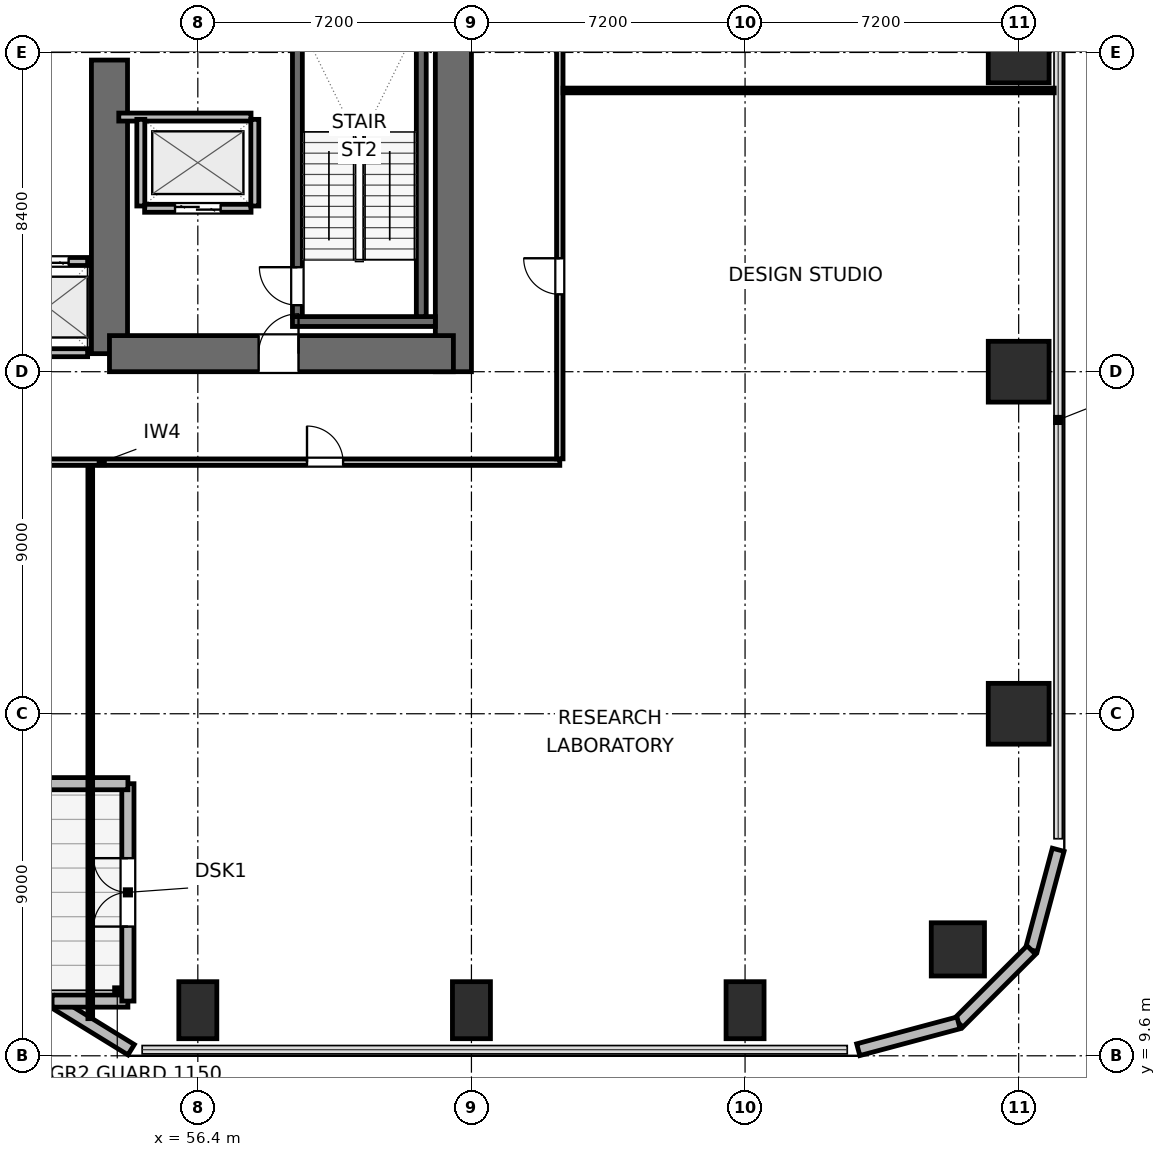
"""IFC4 building model, lengths in metres.
Left out: names, types, materials, properties, quantities, classifications, styles, units other than length and angle.
Written with IfcOpenShell. Run it as: python <this file> out.ifc"""

import sys

from ifc_helpers import new_model, si_unit, direction, frame, frame_2d, origin, origin_2d, place, context, subcontext, project, spatial, rectangle, circle, extrude, element, fill, save


model = new_model("IFC4")
c1 = context("Model", 3, precision=1e-05, world=origin(), true_north=direction((0.0, 1.0)))
c2 = subcontext(c1, "Body", "Model", "MODEL_VIEW")
j1 = project(units=[si_unit("LENGTHUNIT", "METRE"), si_unit("PLANEANGLEUNIT", "RADIAN")], contexts=[c1])
p1 = place(None, origin())
s1 = spatial("IfcSite", under=j1, at=p1, CompositionType="ELEMENT")
p2 = place(p1, origin())
s2 = spatial("IfcBuilding", under=s1, at=p2, CompositionType="ELEMENT")
p3 = place(p2, frame((0.0, 0.0, 68.4)))
s3 = spatial("IfcBuildingStorey", under=s2, at=p3, CompositionType="ELEMENT", Elevation=68.4)
p4 = place(p3, frame((54.075, 28.075, 0.0), z_axis=(0.0, 0.0, 1.0), x_axis=(0.0, 1.0, 0.0)))
e1 = element("IfcWall", 1, at=p4, inside=s3, PredefinedType="SHEAR", context=c2, shape_type="SweptSolid", body=[
    extrude(rectangle(XDim=7.725, YDim=0.95, at=frame_2d((3.863, 0.0))), origin(), (0.0, 0.0, 1.0), 4.5),
])
p5 = place(p3, frame((63.125, 27.6, 0.0), z_axis=(0.0, 0.0, 1.0), x_axis=(0.0, 1.0, 0.0)))
e2 = element("IfcWall", 2, at=p5, inside=s3, PredefinedType="SHEAR", context=c2, shape_type="SweptSolid", body=[
    extrude(rectangle(XDim=16.8, YDim=0.95, at=frame_2d((8.4, 0.0))), origin(), (0.0, 0.0, 1.0), 4.5),
])
p6 = place(p3, frame((54.075, 28.075, 0.0), z_axis=(0.0, 0.0, 1.0), x_axis=(1.0, 0.0, 0.0)))
e3 = element("IfcWall", 3, at=p6, inside=s3, PredefinedType="SHEAR", context=c2, shape_type="SweptSolid", body=[
    extrude(rectangle(XDim=9.05, YDim=0.95, at=frame_2d((4.525, 0.0))), origin(), (0.0, 0.0, 1.0), 4.5),
])
p7 = place(p6, frame((3.925, 0.0, 0.0)))
e4 = element("IfcOpeningElement", 4, at=p7, cuts=e3, PredefinedType="OPENING", context=c2, shape_type="SweptSolid", body=[
    extrude(rectangle(XDim=1.05, YDim=2.04, at=frame_2d((0.525, 1.02))), frame((0.0, 0.485, 0.0), z_axis=(0.0, -1.0, 0.0), x_axis=(1.0, 0.0, 0.0)), (0.0, 0.0, 1.0), 0.97),
])
p8 = place(p3, frame((58.89, 28.92, 0.0), z_axis=(0.0, 0.0, 1.0), x_axis=(1.0, 0.0, 0.0)))
e5 = element("IfcWall", 5, at=p8, inside=s3, PredefinedType="SHEAR", context=c2, shape_type="SweptSolid", body=[
    extrude(rectangle(XDim=3.76, YDim=0.26, at=frame_2d((1.88, 0.0))), origin(), (0.0, 0.0, 1.0), 4.5),
])
p9 = place(p3, frame((59.02, 29.05, 0.0), z_axis=(0.0, 0.0, 1.0), x_axis=(0.0, 1.0, 0.0)))
e6 = element("IfcWall", 6, at=p9, inside=s3, PredefinedType="SHEAR", context=c2, shape_type="SweptSolid", body=[
    extrude(rectangle(XDim=7.6, YDim=0.26, at=frame_2d((3.8, 0.0))), origin(), (0.0, 0.0, 1.0), 4.5),
])
p10 = place(p9, frame((0.3, 0.0, 0.0)))
e7 = element("IfcOpeningElement", 7, at=p10, cuts=e6, PredefinedType="OPENING", context=c2, shape_type="SweptSolid", body=[
    extrude(rectangle(XDim=1.0, YDim=2.04, at=frame_2d((0.5, 1.02))), frame((0.0, 0.14, 0.0), z_axis=(0.0, -1.0, 0.0), x_axis=(1.0, 0.0, 0.0)), (0.0, 0.0, 1.0), 0.28),
])
p11 = place(p3, frame((62.28, 29.05, 0.0), z_axis=(0.0, 0.0, 1.0), x_axis=(0.0, 1.0, 0.0)))
e8 = element("IfcWall", 8, at=p11, inside=s3, PredefinedType="SHEAR", context=c2, shape_type="SweptSolid", body=[
    extrude(rectangle(XDim=7.6, YDim=0.26, at=frame_2d((3.8, 0.0))), origin(), (0.0, 0.0, 1.0), 4.5),
])
p12 = place(p3, frame((76.4, 12.4, 0.0), z_axis=(0.0, 0.0, 1.0), x_axis=(1.0, 0.0, 0.0)))
e9 = element("IfcColumn", 9, at=p12, inside=s3, PredefinedType="COLUMN", context=c2, shape_type="SweptSolid", body=[
    extrude(circle(Radius=0.7, at=origin_2d()), origin(), (0.0, 0.0, 1.0), 4.5),
])
for number, where, z_axis, x_axis in (
    (10, (56.4, 10.8, 0.0), (0.0, 0.0, 1.0), (1.0, 0.0, 0.0)),
    (11, (63.6, 10.8, 0.0), (0.0, 0.0, 1.0), (1.0, 0.0, 0.0)),
    (12, (70.8, 10.8, 0.0), (0.0, 0.0, 1.0), (1.0, 0.0, 0.0)),
):
    element("IfcColumn", number, at=place(p3, frame(where, z_axis=z_axis, x_axis=x_axis)), inside=s3, PredefinedType="COLUMN", context=c2, shape_type="SweptSolid", body=[
        extrude(rectangle(XDim=1.0, YDim=1.5, at=origin_2d()), origin(), (0.0, 0.0, 1.0), 4.5),
    ])
for number, where, z_axis, x_axis in (
    (13, (78.0, 18.6, 0.0), (0.0, 0.0, 1.0), (1.0, 0.0, 0.0)),
    (14, (78.0, 27.6, 0.0), (0.0, 0.0, 1.0), (1.0, 0.0, 0.0)),
    (15, (78.0, 36.0, 0.0), (0.0, 0.0, 1.0), (1.0, 0.0, 0.0)),
):
    element("IfcColumn", number, at=place(p3, frame(where, z_axis=z_axis, x_axis=x_axis)), inside=s3, PredefinedType="COLUMN", context=c2, shape_type="SweptSolid", body=[
        extrude(rectangle(XDim=1.6, YDim=1.6, at=origin_2d()), origin(), (0.0, 0.0, 1.0), 4.5),
    ])
p13 = place(p3, frame((79.04, 15.021, 0.0), z_axis=(0.0, 0.0, 1.0), x_axis=(-0.25869736047, -0.965958423373, 0.0)))
e16 = element("IfcWall", 16, at=p13, inside=s3, PredefinedType="SOLIDWALL", context=c2, shape_type="SweptSolid", body=[
    extrude(rectangle(XDim=2.731, YDim=0.32, at=frame_2d((1.366, 0.0))), origin(), (0.0, 0.0, 1.0), 4.24),
])
p14 = place(p3, frame((78.333, 12.383, 0.0), z_axis=(0.0, 0.0, 1.0), x_axis=(-0.707106781187, -0.707106781187, 0.0)))
e17 = element("IfcWall", 17, at=p14, inside=s3, PredefinedType="SOLIDWALL", context=c2, shape_type="SweptSolid", body=[
    extrude(rectangle(XDim=2.71, YDim=0.32, at=frame_2d((1.355, 0.0))), origin(), (0.0, 0.0, 1.0), 4.24),
])
p15 = place(p3, frame((76.417, 10.467, 0.0), z_axis=(0.0, 0.0, 1.0), x_axis=(-0.965964405026, -0.25867502435, 0.0)))
e18 = element("IfcWall", 18, at=p15, inside=s3, PredefinedType="SOLIDWALL", context=c2, shape_type="SweptSolid", body=[
    extrude(rectangle(XDim=2.731, YDim=0.32, at=frame_2d((1.366, 0.0))), origin(), (0.0, 0.0, 1.0), 4.24),
])
p16 = place(p3, frame((54.645, 9.76, 0.0), z_axis=(0.0, 0.0, 1.0), x_axis=(-0.8516617488, 0.524091848469, 0.0)))
e19 = element("IfcWall", 19, at=p16, inside=s3, PredefinedType="SOLIDWALL", context=c2, shape_type="SweptSolid", body=[
    extrude(rectangle(XDim=2.442, YDim=0.32, at=frame_2d((1.221, 0.0))), origin(), (0.0, 0.0, 1.0), 4.24),
])
p17 = place(p3, frame((52.565, 11.04, 0.0), z_axis=(0.0, 0.0, 1.0), x_axis=(1.0, 0.0, 0.0)))
e20 = element("IfcWall", 20, at=p17, inside=s3, PredefinedType="SOLIDWALL", context=c2, shape_type="SweptSolid", body=[
    extrude(rectangle(XDim=1.995, YDim=0.32, at=frame_2d((0.998, 0.0))), origin(), (0.0, 0.0, 1.0), 3.475),
])
p18 = place(p3, frame((54.56, 11.04, 0.0), z_axis=(0.0, 0.0, 1.0), x_axis=(0.0, 1.0, 0.0)))
e21 = element("IfcWall", 21, at=p18, inside=s3, PredefinedType="SOLIDWALL", context=c2, shape_type="SweptSolid", body=[
    extrude(rectangle(XDim=5.72, YDim=0.32, at=frame_2d((2.86, 0.0))), origin(), (0.0, 0.0, 1.0), 3.475),
])
p19 = place(p18, frame((1.96, 0.0, 0.0)))
e22 = element("IfcOpeningElement", 22, at=p19, cuts=e21, PredefinedType="OPENING", context=c2, shape_type="SweptSolid", body=[
    extrude(rectangle(XDim=1.8, YDim=2.1, at=frame_2d((0.9, 1.05))), frame((0.0, 0.17, 0.0), z_axis=(0.0, -1.0, 0.0), x_axis=(1.0, 0.0, 0.0)), (0.0, 0.0, 1.0), 0.34),
])
p20 = place(p3, frame((54.56, 16.76, 0.0), z_axis=(0.0, 0.0, 1.0), x_axis=(-1.0, 0.0, 0.0)))
e23 = element("IfcWall", 23, at=p20, inside=s3, PredefinedType="SOLIDWALL", context=c2, shape_type="SweptSolid", body=[
    extrude(rectangle(XDim=13.12, YDim=0.32, at=frame_2d((6.56, 0.0))), origin(), (0.0, 0.0, 1.0), 3.53),
])
p21 = place(p3, frame((55.0, 31.9, 0.0), z_axis=(0.0, 0.0, 1.0), x_axis=(1.0, 0.0, 0.0)))
e24 = element("IfcWall", 24, at=p21, inside=s3, PredefinedType="PARTITIONING", context=c2, shape_type="SweptSolid", body=[
    extrude(rectangle(XDim=2.8, YDim=0.21, at=frame_2d((1.4, 0.0))), origin(), (0.0, 0.0, 1.0), 4.24),
])
p22 = place(p21, frame((0.8, 0.0, 0.0)))
e25 = element("IfcOpeningElement", 25, at=p22, cuts=e24, PredefinedType="OPENING", context=c2, shape_type="SweptSolid", body=[
    extrude(rectangle(XDim=1.2, YDim=2.04, at=frame_2d((0.6, 1.02))), frame((0.0, 0.115, 0.0), z_axis=(0.0, -1.0, 0.0), x_axis=(1.0, 0.0, 0.0)), (0.0, 0.0, 1.0), 0.23),
])
p23 = place(p3, frame((54.32, 34.3, 0.0), z_axis=(0.0, 0.0, 1.0), x_axis=(1.0, 0.0, 0.0)))
e26 = element("IfcWall", 26, at=p23, inside=s3, PredefinedType="PARTITIONING", context=c2, shape_type="SweptSolid", body=[
    extrude(rectangle(XDim=3.48, YDim=0.21, at=frame_2d((1.74, 0.0))), origin(), (0.0, 0.0, 1.0), 4.24),
])
for number, where, z_axis, x_axis in (
    (27, (54.9, 31.96, 0.0), (0.0, 0.0, 1.0), (0.0, 1.0, 0.0)),
    (28, (57.9, 31.96, 0.0), (0.0, 0.0, 1.0), (0.0, 1.0, 0.0)),
):
    element("IfcWall", number, at=place(p3, frame(where, z_axis=z_axis, x_axis=x_axis)), inside=s3, PredefinedType="PARTITIONING", context=c2, shape_type="SweptSolid", body=[
        extrude(rectangle(XDim=2.28, YDim=0.21, at=frame_2d((1.14, 0.0))), origin(), (0.0, 0.0, 1.0), 4.24),
    ])
p24 = place(p3, frame((51.4, 30.5, 0.0), z_axis=(0.0, 0.0, 1.0), x_axis=(1.0, 0.0, 0.0)))
e29 = element("IfcWall", 29, at=p24, inside=s3, PredefinedType="PARTITIONING", context=c2, shape_type="SweptSolid", body=[
    extrude(rectangle(XDim=2.1, YDim=0.21, at=frame_2d((1.05, 0.0))), origin(), (0.0, 0.0, 1.0), 4.24),
])
p25 = place(p24, frame((0.5, 0.0, 0.0)))
e30 = element("IfcOpeningElement", 30, at=p25, cuts=e29, PredefinedType="OPENING", context=c2, shape_type="SweptSolid", body=[
    extrude(rectangle(XDim=1.1, YDim=2.04, at=frame_2d((0.55, 1.02))), frame((0.0, 0.115, 0.0), z_axis=(0.0, -1.0, 0.0), x_axis=(1.0, 0.0, 0.0)), (0.0, 0.0, 1.0), 0.23),
])
p26 = place(p3, frame((51.4, 28.1, 0.0), z_axis=(0.0, 0.0, 1.0), x_axis=(1.0, 0.0, 0.0)))
e31 = element("IfcWall", 31, at=p26, inside=s3, PredefinedType="PARTITIONING", context=c2, shape_type="SweptSolid", body=[
    extrude(rectangle(XDim=2.1, YDim=0.21, at=frame_2d((1.05, 0.0))), origin(), (0.0, 0.0, 1.0), 3.125),
])
p27 = place(p3, frame((30.075, 25.22, 0.0), z_axis=(0.0, 0.0, 1.0), x_axis=(1.0, 0.0, 0.0)))
e32 = element("IfcWall", 32, at=p27, inside=s3, PredefinedType="PARTITIONING", context=c2, shape_type="SweptSolid", body=[
    extrude(rectangle(XDim=35.85, YDim=0.17, at=frame_2d((17.925, 0.0))), origin(), (0.0, 0.0, 1.0), 4.24),
])
p28 = place(p27, frame((5.698, 0.0, 0.0)))
e33 = element("IfcOpeningElement", 33, at=p28, cuts=e32, PredefinedType="OPENING", context=c2, shape_type="SweptSolid", body=[
    extrude(rectangle(XDim=0.95, YDim=2.04, at=frame_2d((0.475, 1.02))), frame((0.0, 0.095, 0.0), z_axis=(0.0, -1.0, 0.0), x_axis=(1.0, 0.0, 0.0)), (0.0, 0.0, 1.0), 0.19),
])
p29 = place(p27, frame((17.445, 0.0, 0.0)))
e34 = element("IfcOpeningElement", 34, at=p29, cuts=e32, PredefinedType="OPENING", context=c2, shape_type="SweptSolid", body=[
    extrude(rectangle(XDim=0.95, YDim=2.04, at=frame_2d((0.475, 1.02))), frame((0.0, 0.095, 0.0), z_axis=(0.0, -1.0, 0.0), x_axis=(1.0, 0.0, 0.0)), (0.0, 0.0, 1.0), 0.19),
])
p30 = place(p27, frame((29.198, 0.0, 0.0)))
e35 = element("IfcOpeningElement", 35, at=p30, cuts=e32, PredefinedType="OPENING", context=c2, shape_type="SweptSolid", body=[
    extrude(rectangle(XDim=0.95, YDim=2.04, at=frame_2d((0.475, 1.02))), frame((0.0, 0.095, 0.0), z_axis=(0.0, -1.0, 0.0), x_axis=(1.0, 0.0, 0.0)), (0.0, 0.0, 1.0), 0.19),
])
p31 = place(p3, frame((65.925, 25.307, 0.0), z_axis=(0.0, 0.0, 1.0), x_axis=(0.0, 1.0, 0.0)))
e36 = element("IfcWall", 36, at=p31, inside=s3, PredefinedType="PARTITIONING", context=c2, shape_type="SweptSolid", body=[
    extrude(rectangle(XDim=21.386, YDim=0.17, at=frame_2d((10.693, 0.0))), origin(), (0.0, 0.0, 1.0), 4.24),
])
p32 = place(p31, frame((4.328, 0.0, 0.0)))
e37 = element("IfcOpeningElement", 37, at=p32, cuts=e36, PredefinedType="OPENING", context=c2, shape_type="SweptSolid", body=[
    extrude(rectangle(XDim=0.95, YDim=2.04, at=frame_2d((0.475, 1.02))), frame((0.0, 0.095, 0.0), z_axis=(0.0, -1.0, 0.0), x_axis=(1.0, 0.0, 0.0)), (0.0, 0.0, 1.0), 0.19),
])
p33 = place(p31, frame((15.108, 0.0, 0.0)))
e38 = element("IfcOpeningElement", 38, at=p33, cuts=e36, PredefinedType="OPENING", context=c2, shape_type="SweptSolid", body=[
    extrude(rectangle(XDim=0.95, YDim=2.04, at=frame_2d((0.475, 1.02))), frame((0.0, 0.095, 0.0), z_axis=(0.0, -1.0, 0.0), x_axis=(1.0, 0.0, 0.0)), (0.0, 0.0, 1.0), 0.19),
])
p34 = place(p3, frame((53.57, 10.577, 0.0), z_axis=(0.0, 0.0, 1.0), x_axis=(0.0, 1.0, 0.0)))
e39 = element("IfcWall", 39, at=p34, inside=s3, PredefinedType="PARTITIONING", context=c2, shape_type="SweptSolid", body=[
    extrude(rectangle(XDim=14.556, YDim=0.125, at=frame_2d((7.278, 0.0))), origin(), (0.0, 0.0, 1.0), 3.603),
])
p35 = place(p3, frame((66.012, 35.0, 0.0), z_axis=(0.0, 0.0, 1.0), x_axis=(1.0, 0.0, 0.0)))
e40 = element("IfcWall", 40, at=p35, inside=s3, PredefinedType="PARTITIONING", context=c2, shape_type="SweptSolid", body=[
    extrude(rectangle(XDim=12.923, YDim=0.125, at=frame_2d((6.461, 0.0))), origin(), (0.0, 0.0, 1.0), 4.24),
])
p36 = place(p19, origin())
e41 = element("IfcDoor", 41, at=p36, inside=s3, OperationType="DOUBLE_DOOR_SINGLE_SWING", PredefinedType="DOOR", context=c2, shape_type="SweptSolid", body=[
    extrude(rectangle(XDim=1.8, YDim=2.1, at=frame_2d((0.9, 1.05))), frame((0.0, 0.025, 0.0), z_axis=(0.0, -1.0, 0.0), x_axis=(1.0, 0.0, 0.0)), (0.0, 0.0, 1.0), 0.05),
])
fill(e22, e41)
p37 = place(p10, origin())
e42 = element("IfcDoor", 42, at=p37, inside=s3, OperationType="SINGLE_SWING_RIGHT", PredefinedType="DOOR", context=c2, shape_type="SweptSolid", body=[
    extrude(rectangle(XDim=1.0, YDim=2.04, at=frame_2d((0.5, 1.02))), frame((0.0, 0.025, 0.0), z_axis=(0.0, -1.0, 0.0), x_axis=(1.0, 0.0, 0.0)), (0.0, 0.0, 1.0), 0.05),
])
fill(e7, e42)
p38 = place(p22, origin())
e43 = element("IfcDoor", 43, at=p38, inside=s3, OperationType="DOUBLE_DOOR_SLIDING", PredefinedType="DOOR", context=c2, shape_type="SweptSolid", body=[
    extrude(rectangle(XDim=1.2, YDim=2.04, at=frame_2d((0.6, 1.02))), frame((0.0, 0.025, 0.0), z_axis=(0.0, -1.0, 0.0), x_axis=(1.0, 0.0, 0.0)), (0.0, 0.0, 1.0), 0.05),
])
fill(e25, e43)
p39 = place(p25, origin())
e44 = element("IfcDoor", 44, at=p39, inside=s3, OperationType="DOUBLE_DOOR_SLIDING", PredefinedType="DOOR", context=c2, shape_type="SweptSolid", body=[
    extrude(rectangle(XDim=1.1, YDim=2.04, at=frame_2d((0.55, 1.02))), frame((0.0, 0.025, 0.0), z_axis=(0.0, -1.0, 0.0), x_axis=(1.0, 0.0, 0.0)), (0.0, 0.0, 1.0), 0.05),
])
fill(e30, e44)
p40 = place(p7, origin())
e45 = element("IfcDoor", 45, at=p40, inside=s3, OperationType="SINGLE_SWING_RIGHT", PredefinedType="DOOR", context=c2, shape_type="SweptSolid", body=[
    extrude(rectangle(XDim=1.05, YDim=2.04, at=frame_2d((0.525, 1.02))), frame((0.0, 0.025, 0.0), z_axis=(0.0, -1.0, 0.0), x_axis=(1.0, 0.0, 0.0)), (0.0, 0.0, 1.0), 0.05),
])
fill(e4, e45)
p41 = place(p30, origin())
e46 = element("IfcDoor", 46, at=p41, inside=s3, OperationType="SINGLE_SWING_LEFT", PredefinedType="DOOR", context=c2, shape_type="SweptSolid", body=[
    extrude(rectangle(XDim=0.95, YDim=2.04, at=frame_2d((0.475, 1.02))), frame((0.0, 0.025, 0.0), z_axis=(0.0, -1.0, 0.0), x_axis=(1.0, 0.0, 0.0)), (0.0, 0.0, 1.0), 0.05),
])
fill(e35, e46)
p42 = place(p32, origin())
e47 = element("IfcDoor", 47, at=p42, inside=s3, OperationType="SINGLE_SWING_RIGHT", PredefinedType="DOOR", context=c2, shape_type="SweptSolid", body=[
    extrude(rectangle(XDim=0.95, YDim=2.04, at=frame_2d((0.475, 1.02))), frame((0.0, 0.025, 0.0), z_axis=(0.0, -1.0, 0.0), x_axis=(1.0, 0.0, 0.0)), (0.0, 0.0, 1.0), 0.05),
])
fill(e37, e47)
save(model, sys.argv[1])
